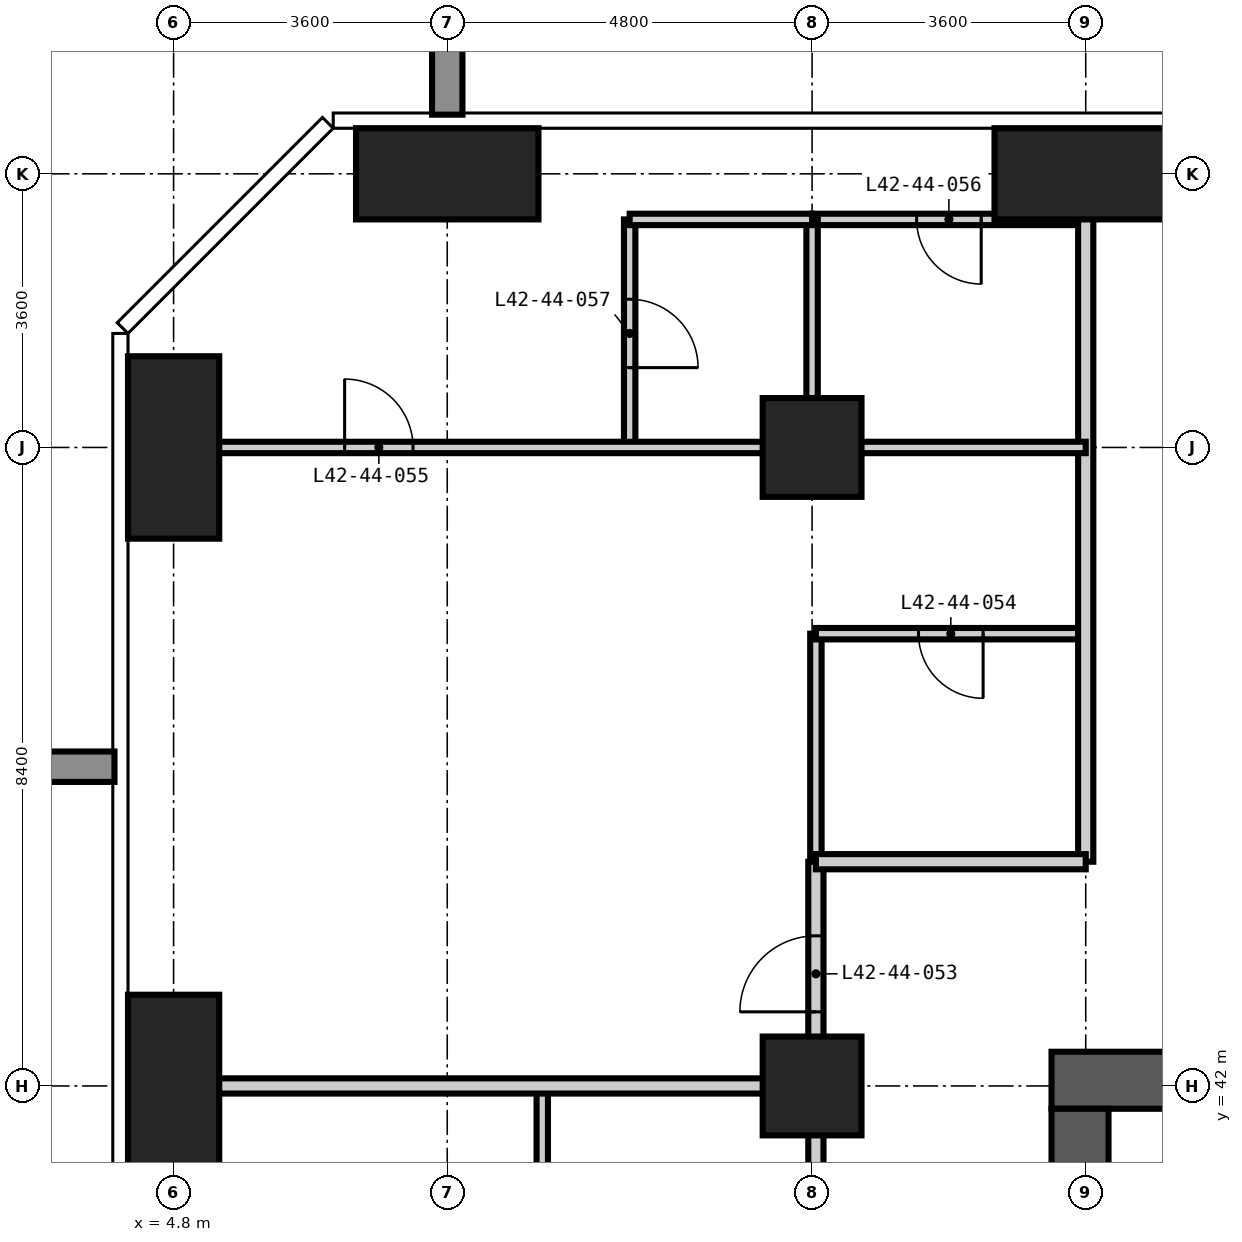
"""IFC4 building model, lengths in metres.
Left out: names, types, materials, properties, quantities, classifications, styles, units other than length and angle.
Written with IfcOpenShell. Run it as: python <this file> out.ifc"""

import sys

from ifc_helpers import new_model, si_unit, direction, frame, frame_2d, origin, origin_2d, place, context, subcontext, project, spatial, rectangle, extrude, element, fill, save


model = new_model("IFC4")
c1 = context("Model", 3, precision=1e-05, world=origin(), true_north=direction((0.0, 1.0)))
c2 = subcontext(c1, "Body", "Model", "MODEL_VIEW")
j1 = project(units=[si_unit("LENGTHUNIT", "METRE"), si_unit("PLANEANGLEUNIT", "RADIAN")], contexts=[c1])
p1 = place(None, origin())
s1 = spatial("IfcSite", under=j1, at=p1, CompositionType="ELEMENT")
p2 = place(p1, origin())
s2 = spatial("IfcBuilding", under=s1, at=p2, CompositionType="ELEMENT")
p3 = place(p2, frame((0.0, 0.0, 166.2)))
s3 = spatial("IfcBuildingStorey", under=s2, at=p3, CompositionType="ELEMENT", Elevation=166.2)
for number, where, z_axis, x_axis in (
    (1, (4.8, 42.0, -0.35), (0.0, 0.0, 1.0), (1.0, 0.0, 0.0)),
    (2, (4.8, 50.4, -0.35), (0.0, 0.0, 1.0), (1.0, 0.0, 0.0)),
):
    element("IfcColumn", number, at=place(p3, frame(where, z_axis=z_axis, x_axis=x_axis)), inside=s3, PredefinedType="COLUMN", context=c2, shape_type="SweptSolid", body=[
        extrude(rectangle(XDim=1.2, YDim=2.4, at=origin_2d()), origin(), (0.0, 0.0, 1.0), 3.6),
    ])
p4 = place(p3, frame((8.4, 54.0, -0.35), z_axis=(0.0, 0.0, 1.0), x_axis=(1.0, 0.0, 0.0)))
e3 = element("IfcColumn", 3, at=p4, inside=s3, PredefinedType="COLUMN", context=c2, shape_type="SweptSolid", body=[
    extrude(rectangle(XDim=2.4, YDim=1.2, at=origin_2d()), origin(), (0.0, 0.0, 1.0), 3.6),
])
for number, where, z_axis, x_axis in (
    (4, (13.2, 42.0, -0.35), (0.0, 0.0, 1.0), (1.0, 0.0, 0.0)),
    (5, (13.2, 50.4, -0.35), (0.0, 0.0, 1.0), (1.0, 0.0, 0.0)),
):
    element("IfcColumn", number, at=place(p3, frame(where, z_axis=z_axis, x_axis=x_axis)), inside=s3, PredefinedType="COLUMN", context=c2, shape_type="SweptSolid", body=[
        extrude(rectangle(XDim=1.3, YDim=1.3, at=origin_2d()), origin(), (0.0, 0.0, 1.0), 3.6),
    ])
p5 = place(p3, frame((16.8, 54.0, -0.35), z_axis=(0.0, 0.0, 1.0), x_axis=(1.0, 0.0, 0.0)))
e6 = element("IfcColumn", 6, at=p5, inside=s3, PredefinedType="COLUMN", context=c2, shape_type="SweptSolid", body=[
    extrude(rectangle(XDim=2.4, YDim=1.2, at=origin_2d()), origin(), (0.0, 0.0, 1.0), 3.6),
])
p6 = place(p3, frame((42.45, 42.075, -0.35), z_axis=(0.0, 0.0, 1.0), x_axis=(-1.0, 0.0, 0.0)))
e7 = element("IfcWall", 7, at=p6, inside=s3, PredefinedType="SHEAR", context=c2, shape_type="SweptSolid", body=[
    extrude(rectangle(XDim=26.1, YDim=0.75, at=frame_2d((13.05, 0.0))), origin(), (0.0, 0.0, 1.0), 3.6),
])
p7 = place(p6, frame((20.95, 0.0, 0.35)))
e8 = element("IfcOpeningElement", 8, at=p7, cuts=e7, PredefinedType="OPENING", context=c2, shape_type="SweptSolid", body=[
    extrude(rectangle(XDim=1.0, YDim=2.1, at=frame_2d((0.5, 1.05))), frame((0.0, 0.385, 0.0), z_axis=(0.0, -1.0, 0.0), x_axis=(1.0, 0.0, 0.0)), (0.0, 0.0, 1.0), 0.77),
])
p8 = place(p6, frame((10.35, 0.0, 0.35)))
e9 = element("IfcOpeningElement", 9, at=p8, cuts=e7, PredefinedType="OPENING", context=c2, shape_type="SweptSolid", body=[
    extrude(rectangle(XDim=1.2, YDim=2.2, at=frame_2d((0.6, 1.1))), frame((0.0, 0.385, 0.0), z_axis=(0.0, -1.0, 0.0), x_axis=(1.0, 0.0, 0.0)), (0.0, 0.0, 1.0), 0.77),
])
p9 = place(p3, frame((16.725, 41.7, -0.35), z_axis=(0.0, 0.0, 1.0), x_axis=(0.0, -1.0, 0.0)))
e10 = element("IfcWall", 10, at=p9, inside=s3, PredefinedType="SHEAR", context=c2, shape_type="SweptSolid", body=[
    extrude(rectangle(XDim=24.6, YDim=0.75, at=frame_2d((12.3, 0.0))), origin(), (0.0, 0.0, 1.0), 3.6),
])
p10 = place(p9, frame((11.4, 0.0, 0.35)))
e11 = element("IfcOpeningElement", 11, at=p10, cuts=e10, PredefinedType="OPENING", context=c2, shape_type="SweptSolid", body=[
    extrude(rectangle(XDim=1.8, YDim=2.2, at=frame_2d((0.9, 1.1))), frame((0.0, 0.385, 0.0), z_axis=(0.0, -1.0, 0.0), x_axis=(1.0, 0.0, 0.0)), (0.0, 0.0, 1.0), 0.77),
])
p11 = place(p9, frame((20.2, 0.0, 0.35)))
e12 = element("IfcOpeningElement", 12, at=p11, cuts=e10, PredefinedType="OPENING", context=c2, shape_type="SweptSolid", body=[
    extrude(rectangle(XDim=1.0, YDim=2.1, at=frame_2d((0.5, 1.05))), frame((0.0, 0.385, 0.0), z_axis=(0.0, -1.0, 0.0), x_axis=(1.0, 0.0, 0.0)), (0.0, 0.0, 1.0), 0.77),
])
p12 = place(p9, frame((5.5, 0.0, 0.35)))
e13 = element("IfcOpeningElement", 13, at=p12, cuts=e10, PredefinedType="OPENING", context=c2, shape_type="SweptSolid", body=[
    extrude(rectangle(XDim=1.0, YDim=2.1, at=frame_2d((0.5, 1.05))), frame((0.0, 0.385, 0.0), z_axis=(0.0, -1.0, 0.0), x_axis=(1.0, 0.0, 0.0)), (0.0, 0.0, 1.0), 0.77),
])
p13 = place(p3, frame((9.65, 39.6, 0.0), z_axis=(0.0, 0.0, 1.0), x_axis=(0.0, 1.0, 0.0)))
e14 = element("IfcWall", 14, at=p13, inside=s3, PredefinedType="PARTITIONING", context=c2, shape_type="SweptSolid", body=[
    extrude(rectangle(XDim=2.4, YDim=0.15, at=frame_2d((1.2, 0.0))), origin(), (0.0, 0.0, 1.0), 3.25),
])
p14 = place(p3, frame((13.25, 44.95, 0.0), z_axis=(0.0, 0.0, 1.0), x_axis=(0.0, 1.0, 0.0)))
e15 = element("IfcWall", 15, at=p14, inside=s3, PredefinedType="PARTITIONING", context=c2, shape_type="SweptSolid", body=[
    extrude(rectangle(XDim=3.0, YDim=0.15, at=frame_2d((1.5, 0.0))), origin(), (0.0, 0.0, 1.0), 3.25),
])
p15 = place(p3, frame((13.25, 47.95, 0.0), z_axis=(0.0, 0.0, 1.0), x_axis=(1.0, 0.0, 0.0)))
e16 = element("IfcWall", 16, at=p15, inside=s3, PredefinedType="PARTITIONING", context=c2, shape_type="SweptSolid", body=[
    extrude(rectangle(XDim=3.55, YDim=0.15, at=frame_2d((1.775, 0.0))), origin(), (0.0, 0.0, 1.0), 3.25),
])
p16 = place(p15, frame((1.35, 0.0, 0.0)))
e17 = element("IfcOpeningElement", 17, at=p16, cuts=e16, PredefinedType="OPENING", context=c2, shape_type="SweptSolid", body=[
    extrude(rectangle(XDim=0.85, YDim=2.1, at=frame_2d((0.425, 1.05))), frame((0.0, 0.085, 0.0), z_axis=(0.0, -1.0, 0.0), x_axis=(1.0, 0.0, 0.0)), (0.0, 0.0, 1.0), 0.17),
])
p17 = place(p3, frame((13.2, 53.4, 0.0), z_axis=(0.0, 0.0, 1.0), x_axis=(1.0, 0.0, 0.0)))
e18 = element("IfcWall", 18, at=p17, inside=s3, PredefinedType="PARTITIONING", context=c2, shape_type="SweptSolid", body=[
    extrude(rectangle(XDim=3.6, YDim=0.15, at=frame_2d((1.8, 0.0))), origin(), (0.0, 0.0, 1.0), 3.25),
])
p18 = place(p17, frame((1.375, 0.0, 0.0)))
e19 = element("IfcOpeningElement", 19, at=p18, cuts=e18, PredefinedType="OPENING", context=c2, shape_type="SweptSolid", body=[
    extrude(rectangle(XDim=0.85, YDim=2.1, at=frame_2d((0.425, 1.05))), frame((0.0, 0.085, 0.0), z_axis=(0.0, -1.0, 0.0), x_axis=(1.0, 0.0, 0.0)), (0.0, 0.0, 1.0), 0.17),
])
p19 = place(p3, frame((13.25, 13.25, 0.0), z_axis=(0.0, 0.0, 1.0), x_axis=(0.0, 1.0, 0.0)))
e20 = element("IfcWall", 20, at=p19, inside=s3, PredefinedType="PARTITIONING", context=c2, shape_type="SweptSolid", body=[
    extrude(rectangle(XDim=31.7, YDim=0.2, at=frame_2d((15.85, 0.0))), origin(), (0.0, 0.0, 1.0), 3.25),
])
p20 = place(p19, frame((6.35, 0.0, 0.0)))
e21 = element("IfcOpeningElement", 21, at=p20, cuts=e20, PredefinedType="OPENING", context=c2, shape_type="SweptSolid", body=[
    extrude(rectangle(XDim=1.0, YDim=2.2, at=frame_2d((0.5, 1.1))), frame((0.0, 0.11, 0.0), z_axis=(0.0, -1.0, 0.0), x_axis=(1.0, 0.0, 0.0)), (0.0, 0.0, 1.0), 0.22),
])
p21 = place(p19, frame((8.15, 0.0, 0.0)))
e22 = element("IfcOpeningElement", 22, at=p21, cuts=e20, PredefinedType="OPENING", context=c2, shape_type="SweptSolid", body=[
    extrude(rectangle(XDim=1.0, YDim=2.2, at=frame_2d((0.5, 1.1))), frame((0.0, 0.11, 0.0), z_axis=(0.0, -1.0, 0.0), x_axis=(1.0, 0.0, 0.0)), (0.0, 0.0, 1.0), 0.22),
])
p22 = place(p19, frame((14.75, 0.0, 0.0)))
e23 = element("IfcOpeningElement", 23, at=p22, cuts=e20, PredefinedType="OPENING", context=c2, shape_type="SweptSolid", body=[
    extrude(rectangle(XDim=1.0, YDim=2.2, at=frame_2d((0.5, 1.1))), frame((0.0, 0.11, 0.0), z_axis=(0.0, -1.0, 0.0), x_axis=(1.0, 0.0, 0.0)), (0.0, 0.0, 1.0), 0.22),
])
p23 = place(p19, frame((16.55, 0.0, 0.0)))
e24 = element("IfcOpeningElement", 24, at=p23, cuts=e20, PredefinedType="OPENING", context=c2, shape_type="SweptSolid", body=[
    extrude(rectangle(XDim=1.0, YDim=2.2, at=frame_2d((0.5, 1.1))), frame((0.0, 0.11, 0.0), z_axis=(0.0, -1.0, 0.0), x_axis=(1.0, 0.0, 0.0)), (0.0, 0.0, 1.0), 0.22),
])
p24 = place(p19, frame((23.15, 0.0, 0.0)))
e25 = element("IfcOpeningElement", 25, at=p24, cuts=e20, PredefinedType="OPENING", context=c2, shape_type="SweptSolid", body=[
    extrude(rectangle(XDim=1.0, YDim=2.2, at=frame_2d((0.5, 1.1))), frame((0.0, 0.11, 0.0), z_axis=(0.0, -1.0, 0.0), x_axis=(1.0, 0.0, 0.0)), (0.0, 0.0, 1.0), 0.22),
])
p25 = place(p19, frame((24.95, 0.0, 0.0)))
e26 = element("IfcOpeningElement", 26, at=p25, cuts=e20, PredefinedType="OPENING", context=c2, shape_type="SweptSolid", body=[
    extrude(rectangle(XDim=1.0, YDim=2.2, at=frame_2d((0.5, 1.1))), frame((0.0, 0.11, 0.0), z_axis=(0.0, -1.0, 0.0), x_axis=(1.0, 0.0, 0.0)), (0.0, 0.0, 1.0), 0.22),
])
p26 = place(p19, frame((1.275, 0.0, 0.0)))
e27 = element("IfcOpeningElement", 27, at=p26, cuts=e20, PredefinedType="OPENING", context=c2, shape_type="SweptSolid", body=[
    extrude(rectangle(XDim=1.0, YDim=2.2, at=frame_2d((0.5, 1.1))), frame((0.0, 0.11, 0.0), z_axis=(0.0, -1.0, 0.0), x_axis=(1.0, 0.0, 0.0)), (0.0, 0.0, 1.0), 0.22),
])
p27 = place(p19, frame((29.725, 0.0, 0.0)))
e28 = element("IfcOpeningElement", 28, at=p27, cuts=e20, PredefinedType="OPENING", context=c2, shape_type="SweptSolid", body=[
    extrude(rectangle(XDim=1.0, YDim=2.2, at=frame_2d((0.5, 1.1))), frame((0.0, 0.11, 0.0), z_axis=(0.0, -1.0, 0.0), x_axis=(1.0, 0.0, 0.0)), (0.0, 0.0, 1.0), 0.22),
])
p28 = place(p3, frame((16.8, 44.95, 0.0), z_axis=(0.0, 0.0, 1.0), x_axis=(0.0, 1.0, 0.0)))
e29 = element("IfcWall", 29, at=p28, inside=s3, PredefinedType="PARTITIONING", context=c2, shape_type="SweptSolid", body=[
    extrude(rectangle(XDim=9.668, YDim=0.2, at=frame_2d((4.834, 0.0))), origin(), (0.0, 0.0, 1.0), 3.25),
])
p29 = place(p3, frame((13.25, 44.95, 0.0), z_axis=(0.0, 0.0, 1.0), x_axis=(1.0, 0.0, 0.0)))
e30 = element("IfcWall", 30, at=p29, inside=s3, PredefinedType="PARTITIONING", context=c2, shape_type="SweptSolid", body=[
    extrude(rectangle(XDim=3.55, YDim=0.2, at=frame_2d((1.775, 0.0))), origin(), (0.0, 0.0, 1.0), 3.25),
])
p30 = place(p3, frame((4.182, 42.0, 0.0), z_axis=(0.0, 0.0, 1.0), x_axis=(1.0, 0.0, 0.0)))
e31 = element("IfcWall", 31, at=p30, inside=s3, PredefinedType="PARTITIONING", context=c2, shape_type="SweptSolid", body=[
    extrude(rectangle(XDim=9.068, YDim=0.2, at=frame_2d((4.534, 0.0))), origin(), (0.0, 0.0, 1.0), 3.25),
])
p31 = place(p3, frame((10.8, 50.4, 0.0), z_axis=(0.0, 0.0, 1.0), x_axis=(0.0, 1.0, 0.0)))
e32 = element("IfcWall", 32, at=p31, inside=s3, PredefinedType="PARTITIONING", context=c2, shape_type="SweptSolid", body=[
    extrude(rectangle(XDim=3.0, YDim=0.15, at=frame_2d((1.5, 0.0))), origin(), (0.0, 0.0, 1.0), 3.25),
])
p32 = place(p31, frame((1.05, 0.0, 0.0)))
e33 = element("IfcOpeningElement", 33, at=p32, cuts=e32, PredefinedType="OPENING", context=c2, shape_type="SweptSolid", body=[
    extrude(rectangle(XDim=0.9, YDim=2.1, at=frame_2d((0.45, 1.05))), frame((0.0, 0.085, 0.0), z_axis=(0.0, -1.0, 0.0), x_axis=(1.0, 0.0, 0.0)), (0.0, 0.0, 1.0), 0.17),
])
p33 = place(p3, frame((13.2, 50.4, 0.0), z_axis=(0.0, 0.0, 1.0), x_axis=(0.0, 1.0, 0.0)))
e34 = element("IfcWall", 34, at=p33, inside=s3, PredefinedType="PARTITIONING", context=c2, shape_type="SweptSolid", body=[
    extrude(rectangle(XDim=3.0, YDim=0.15, at=frame_2d((1.5, 0.0))), origin(), (0.0, 0.0, 1.0), 3.25),
])
p34 = place(p3, frame((4.182, 50.4, 0.0), z_axis=(0.0, 0.0, 1.0), x_axis=(1.0, 0.0, 0.0)))
e35 = element("IfcWall", 35, at=p34, inside=s3, PredefinedType="PARTITIONING", context=c2, shape_type="SweptSolid", body=[
    extrude(rectangle(XDim=12.618, YDim=0.15, at=frame_2d((6.309, 0.0))), origin(), (0.0, 0.0, 1.0), 3.25),
])
p35 = place(p34, frame((2.868, 0.0, 0.0)))
e36 = element("IfcOpeningElement", 36, at=p35, cuts=e35, PredefinedType="OPENING", context=c2, shape_type="SweptSolid", body=[
    extrude(rectangle(XDim=0.9, YDim=2.1, at=frame_2d((0.45, 1.05))), frame((0.0, 0.085, 0.0), z_axis=(0.0, -1.0, 0.0), x_axis=(1.0, 0.0, 0.0)), (0.0, 0.0, 1.0), 0.17),
])
p36 = place(p3, frame((10.8, 53.4, 0.0), z_axis=(0.0, 0.0, 1.0), x_axis=(1.0, 0.0, 0.0)))
e37 = element("IfcWall", 37, at=p36, inside=s3, PredefinedType="PARTITIONING", context=c2, shape_type="SweptSolid", body=[
    extrude(rectangle(XDim=2.4, YDim=0.15, at=frame_2d((1.2, 0.0))), origin(), (0.0, 0.0, 1.0), 3.25),
])
p37 = place(p27, origin())
e38 = element("IfcDoor", 38, at=p37, inside=s3, OperationType="SINGLE_SWING_LEFT", PredefinedType="DOOR", context=c2, shape_type="SweptSolid", body=[
    extrude(rectangle(XDim=1.0, YDim=2.2, at=frame_2d((0.5, 1.1))), frame((0.0, 0.025, 0.0), z_axis=(0.0, -1.0, 0.0), x_axis=(1.0, 0.0, 0.0)), (0.0, 0.0, 1.0), 0.05),
])
fill(e28, e38)
p38 = place(p16, frame((0.85, 0.0, 0.0), z_axis=(0.0, 0.0, 1.0), x_axis=(-1.0, 0.0, 0.0)))
e39 = element("IfcDoor", 39, at=p38, inside=s3, OperationType="SINGLE_SWING_LEFT", PredefinedType="DOOR", context=c2, shape_type="SweptSolid", body=[
    extrude(rectangle(XDim=0.85, YDim=2.1, at=frame_2d((0.425, 1.05))), frame((0.0, 0.025, 0.0), z_axis=(0.0, -1.0, 0.0), x_axis=(1.0, 0.0, 0.0)), (0.0, 0.0, 1.0), 0.05),
])
fill(e17, e39)
p39 = place(p35, origin())
e40 = element("IfcDoor", 40, at=p39, inside=s3, OperationType="SINGLE_SWING_LEFT", PredefinedType="DOOR", context=c2, shape_type="SweptSolid", body=[
    extrude(rectangle(XDim=0.9, YDim=2.1, at=frame_2d((0.45, 1.05))), frame((0.0, 0.025, 0.0), z_axis=(0.0, -1.0, 0.0), x_axis=(1.0, 0.0, 0.0)), (0.0, 0.0, 1.0), 0.05),
])
fill(e36, e40)
p40 = place(p18, frame((0.85, 0.0, 0.0), z_axis=(0.0, 0.0, 1.0), x_axis=(-1.0, 0.0, 0.0)))
e41 = element("IfcDoor", 41, at=p40, inside=s3, OperationType="SINGLE_SWING_LEFT", PredefinedType="DOOR", context=c2, shape_type="SweptSolid", body=[
    extrude(rectangle(XDim=0.85, YDim=2.1, at=frame_2d((0.425, 1.05))), frame((0.0, 0.025, 0.0), z_axis=(0.0, -1.0, 0.0), x_axis=(1.0, 0.0, 0.0)), (0.0, 0.0, 1.0), 0.05),
])
fill(e19, e41)
p41 = place(p32, frame((0.9, 0.0, 0.0), z_axis=(0.0, 0.0, 1.0), x_axis=(-1.0, 0.0, 0.0)))
e42 = element("IfcDoor", 42, at=p41, inside=s3, OperationType="SINGLE_SWING_RIGHT", PredefinedType="DOOR", context=c2, shape_type="SweptSolid", body=[
    extrude(rectangle(XDim=0.9, YDim=2.1, at=frame_2d((0.45, 1.05))), frame((0.0, 0.025, 0.0), z_axis=(0.0, -1.0, 0.0), x_axis=(1.0, 0.0, 0.0)), (0.0, 0.0, 1.0), 0.05),
])
fill(e33, e42)
save(model, sys.argv[1])
